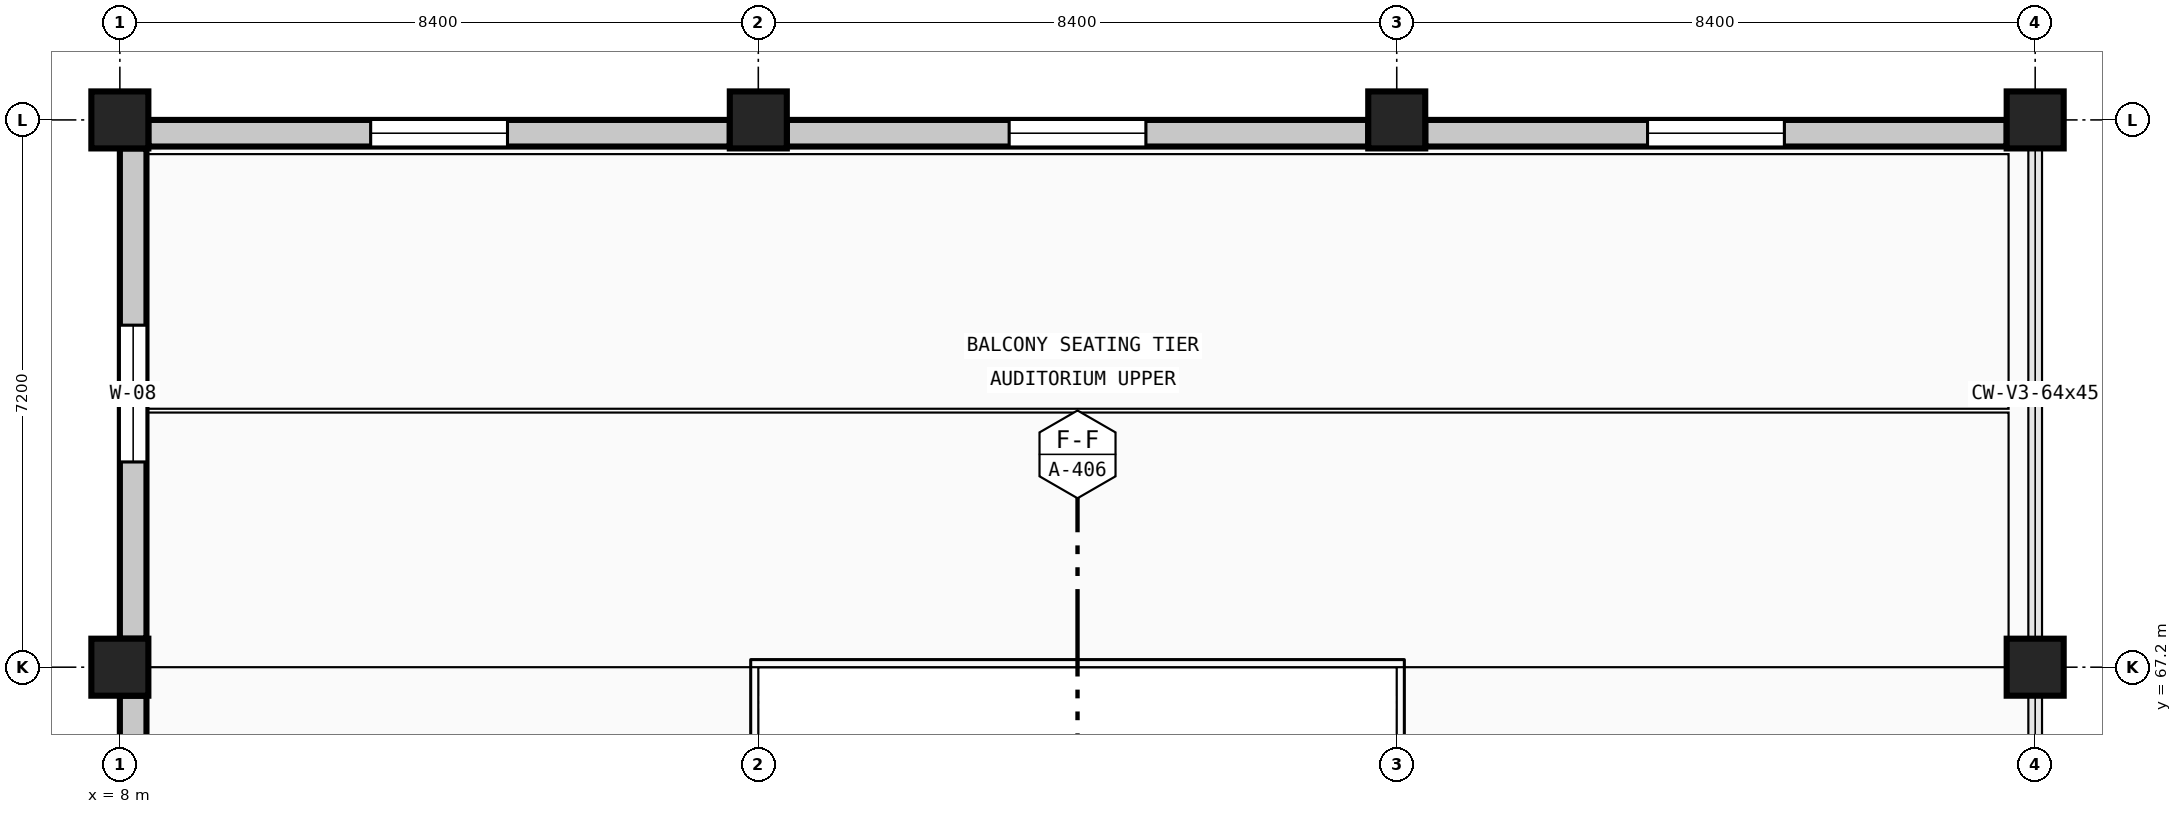
"""IFC4 building model, lengths in metres.
Left out: names, types, materials, properties, quantities, classifications, styles, units other than length and angle.
Written with IfcOpenShell. Run it as: python <this file> out.ifc"""

import sys

from ifc_helpers import new_model, si_unit, direction, frame, frame_2d, origin, origin_2d, place, context, subcontext, project, spatial, rectangle, extrude, element, fill, save


model = new_model("IFC4")
c1 = context("Model", 3, precision=1e-05, world=origin(), true_north=direction((0.0, 1.0)))
c2 = subcontext(c1, "Body", "Model", "MODEL_VIEW")
j1 = project(units=[si_unit("LENGTHUNIT", "METRE"), si_unit("PLANEANGLEUNIT", "RADIAN")], contexts=[c1])
p1 = place(None, origin())
s1 = spatial("IfcSite", under=j1, at=p1, CompositionType="ELEMENT")
p2 = place(p1, origin())
s2 = spatial("IfcBuilding", under=s1, at=p2, CompositionType="ELEMENT")
p3 = place(p2, frame((0.0, 0.0, 4.8)))
s3 = spatial("IfcBuildingStorey", under=s2, at=p3, CompositionType="ELEMENT", Elevation=4.8)
for number, where, z_axis, x_axis in (
    (1, (8.0, 67.2, 0.0), (0.0, 0.0, 1.0), (1.0, 0.0, 0.0)),
    (2, (8.0, 74.4, 0.0), (0.0, 0.0, 1.0), (1.0, 0.0, 0.0)),
    (3, (16.4, 74.4, 0.0), (0.0, 0.0, 1.0), (1.0, 0.0, 0.0)),
    (4, (24.8, 74.4, 0.0), (0.0, 0.0, 1.0), (1.0, 0.0, 0.0)),
    (5, (33.2, 67.2, 0.0), (0.0, 0.0, 1.0), (1.0, 0.0, 0.0)),
    (6, (33.2, 74.4, 0.0), (0.0, 0.0, 1.0), (1.0, 0.0, 0.0)),
):
    element("IfcColumn", number, at=place(p3, frame(where, z_axis=z_axis, x_axis=x_axis)), inside=s3, PredefinedType="COLUMN", context=c2, shape_type="SweptSolid", body=[
        extrude(rectangle(XDim=0.75, YDim=0.75, at=origin_2d()), origin(), (0.0, 0.0, 1.0), 4.8),
    ])
p4 = place(p3, frame((8.175, 60.375, 0.0), z_axis=(0.0, 0.0, 1.0), x_axis=(0.0, 1.0, 0.0)))
e7 = element("IfcWall", 7, at=p4, inside=s3, PredefinedType="SOLIDWALL", context=c2, shape_type="SweptSolid", body=[
    extrude(rectangle(XDim=6.45, YDim=0.35, at=frame_2d((3.225, 0.0))), origin(), (0.0, 0.0, 1.0), 4.5),
])
p5 = place(p4, frame((2.325, 0.0, 2.2)))
e8 = element("IfcOpeningElement", 8, at=p5, cuts=e7, PredefinedType="OPENING", context=c2, shape_type="SweptSolid", body=[
    extrude(rectangle(XDim=1.8, YDim=1.35, at=frame_2d((0.9, 0.675))), frame((0.0, 0.185, 0.0), z_axis=(0.0, -1.0, 0.0), x_axis=(1.0, 0.0, 0.0)), (0.0, 0.0, 1.0), 0.37),
])
p6 = place(p3, frame((8.175, 67.575, 0.0), z_axis=(0.0, 0.0, 1.0), x_axis=(0.0, 1.0, 0.0)))
e9 = element("IfcWall", 9, at=p6, inside=s3, PredefinedType="SOLIDWALL", context=c2, shape_type="SweptSolid", body=[
    extrude(rectangle(XDim=6.45, YDim=0.35, at=frame_2d((3.225, 0.0))), origin(), (0.0, 0.0, 1.0), 4.5),
])
p7 = place(p6, frame((2.325, 0.0, 2.2)))
e10 = element("IfcOpeningElement", 10, at=p7, cuts=e9, PredefinedType="OPENING", context=c2, shape_type="SweptSolid", body=[
    extrude(rectangle(XDim=1.8, YDim=1.35, at=frame_2d((0.9, 0.675))), frame((0.0, 0.185, 0.0), z_axis=(0.0, -1.0, 0.0), x_axis=(1.0, 0.0, 0.0)), (0.0, 0.0, 1.0), 0.37),
])
p8 = place(p3, frame((8.375, 74.225, 0.0), z_axis=(0.0, 0.0, 1.0), x_axis=(1.0, 0.0, 0.0)))
e11 = element("IfcWall", 11, at=p8, inside=s3, PredefinedType="SOLIDWALL", context=c2, shape_type="SweptSolid", body=[
    extrude(rectangle(XDim=7.65, YDim=0.35, at=frame_2d((3.825, 0.0))), origin(), (0.0, 0.0, 1.0), 4.1),
])
p9 = place(p8, frame((2.925, 0.0, 2.2)))
e12 = element("IfcOpeningElement", 12, at=p9, cuts=e11, PredefinedType="OPENING", context=c2, shape_type="SweptSolid", body=[
    extrude(rectangle(XDim=1.8, YDim=1.35, at=frame_2d((0.9, 0.675))), frame((0.0, 0.185, 0.0), z_axis=(0.0, -1.0, 0.0), x_axis=(1.0, 0.0, 0.0)), (0.0, 0.0, 1.0), 0.37),
])
p10 = place(p3, frame((16.775, 74.225, 0.0), z_axis=(0.0, 0.0, 1.0), x_axis=(1.0, 0.0, 0.0)))
e13 = element("IfcWall", 13, at=p10, inside=s3, PredefinedType="SOLIDWALL", context=c2, shape_type="SweptSolid", body=[
    extrude(rectangle(XDim=7.65, YDim=0.35, at=frame_2d((3.825, 0.0))), origin(), (0.0, 0.0, 1.0), 4.1),
])
p11 = place(p10, frame((2.925, 0.0, 2.2)))
e14 = element("IfcOpeningElement", 14, at=p11, cuts=e13, PredefinedType="OPENING", context=c2, shape_type="SweptSolid", body=[
    extrude(rectangle(XDim=1.8, YDim=1.35, at=frame_2d((0.9, 0.675))), frame((0.0, 0.185, 0.0), z_axis=(0.0, -1.0, 0.0), x_axis=(1.0, 0.0, 0.0)), (0.0, 0.0, 1.0), 0.37),
])
p12 = place(p3, frame((25.175, 74.225, 0.0), z_axis=(0.0, 0.0, 1.0), x_axis=(1.0, 0.0, 0.0)))
e15 = element("IfcWall", 15, at=p12, inside=s3, PredefinedType="SOLIDWALL", context=c2, shape_type="SweptSolid", body=[
    extrude(rectangle(XDim=7.65, YDim=0.35, at=frame_2d((3.825, 0.0))), origin(), (0.0, 0.0, 1.0), 4.1),
])
p13 = place(p12, frame((2.925, 0.0, 2.2)))
e16 = element("IfcOpeningElement", 16, at=p13, cuts=e15, PredefinedType="OPENING", context=c2, shape_type="SweptSolid", body=[
    extrude(rectangle(XDim=1.8, YDim=1.35, at=frame_2d((0.9, 0.675))), frame((0.0, 0.185, 0.0), z_axis=(0.0, -1.0, 0.0), x_axis=(1.0, 0.0, 0.0)), (0.0, 0.0, 1.0), 0.37),
])
p14 = place(p7, origin())
e17 = element("IfcWindow", 17, at=p14, inside=s3, PartitioningType="SINGLE_PANEL", PredefinedType="WINDOW", context=c2, shape_type="SweptSolid", body=[
    extrude(rectangle(XDim=1.8, YDim=1.35, at=frame_2d((0.9, 0.675))), frame((0.0, 0.03, 0.0), z_axis=(0.0, -1.0, 0.0), x_axis=(1.0, 0.0, 0.0)), (0.0, 0.0, 1.0), 0.06),
])
fill(e10, e17)
p15 = place(p9, origin())
e18 = element("IfcWindow", 18, at=p15, inside=s3, PartitioningType="SINGLE_PANEL", PredefinedType="WINDOW", context=c2, shape_type="SweptSolid", body=[
    extrude(rectangle(XDim=1.8, YDim=1.35, at=frame_2d((0.9, 0.675))), frame((0.0, 0.03, 0.0), z_axis=(0.0, -1.0, 0.0), x_axis=(1.0, 0.0, 0.0)), (0.0, 0.0, 1.0), 0.06),
])
fill(e12, e18)
p16 = place(p11, origin())
e19 = element("IfcWindow", 19, at=p16, inside=s3, PartitioningType="SINGLE_PANEL", PredefinedType="WINDOW", context=c2, shape_type="SweptSolid", body=[
    extrude(rectangle(XDim=1.8, YDim=1.35, at=frame_2d((0.9, 0.675))), frame((0.0, 0.03, 0.0), z_axis=(0.0, -1.0, 0.0), x_axis=(1.0, 0.0, 0.0)), (0.0, 0.0, 1.0), 0.06),
])
fill(e14, e19)
p17 = place(p13, origin())
e20 = element("IfcWindow", 20, at=p17, inside=s3, PartitioningType="SINGLE_PANEL", PredefinedType="WINDOW", context=c2, shape_type="SweptSolid", body=[
    extrude(rectangle(XDim=1.8, YDim=1.35, at=frame_2d((0.9, 0.675))), frame((0.0, 0.03, 0.0), z_axis=(0.0, -1.0, 0.0), x_axis=(1.0, 0.0, 0.0)), (0.0, 0.0, 1.0), 0.06),
])
fill(e16, e20)
save(model, sys.argv[1])
